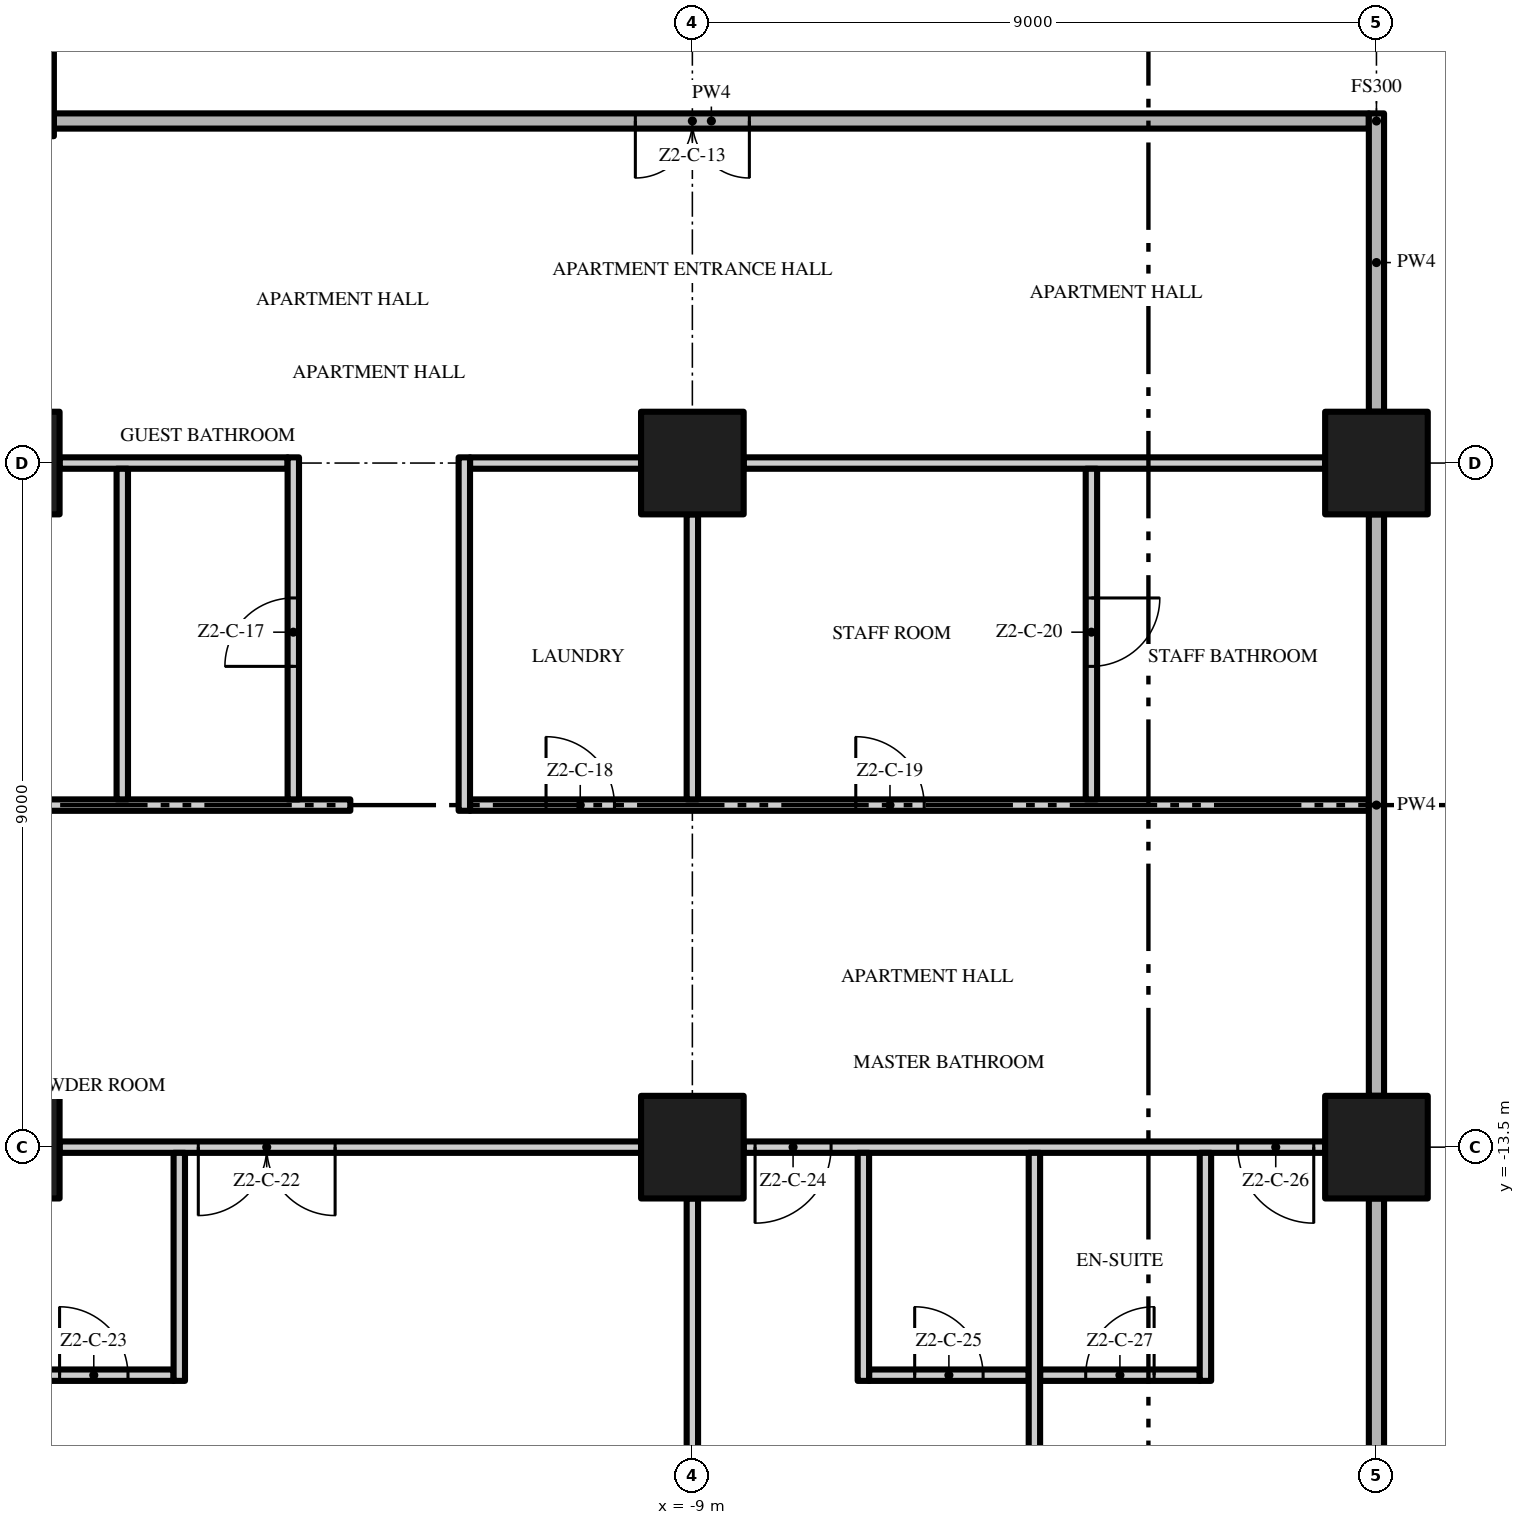
"""IFC4 building model, lengths in metres.
Left out: names, types, materials, properties, quantities, classifications, styles, units other than length and angle.
Written with IfcOpenShell. Run it as: python <this file> out.ifc"""

import sys

from ifc_helpers import new_model, si_unit, direction, frame, frame_2d, origin, origin_2d, place, context, subcontext, project, spatial, rectangle, extrude, element, fill, save


model = new_model("IFC4")
c1 = context("Model", 3, precision=1e-05, world=origin(), true_north=direction((0.0, 1.0)))
c2 = subcontext(c1, "Body", "Model", "MODEL_VIEW")
j1 = project(units=[si_unit("LENGTHUNIT", "METRE"), si_unit("PLANEANGLEUNIT", "RADIAN")], contexts=[c1])
p1 = place(None, origin())
s1 = spatial("IfcSite", under=j1, at=p1, CompositionType="ELEMENT")
p2 = place(p1, origin())
s2 = spatial("IfcBuilding", under=s1, at=p2, CompositionType="ELEMENT")
p3 = place(p2, frame((0.0, 0.0, 99.8)))
s3 = spatial("IfcBuildingStorey", under=s2, at=p3, CompositionType="ELEMENT", Elevation=99.8)
for number, where, z_axis, x_axis in (
    (1, (-18.0, -13.5, 0.0), (0.0, 0.0, 1.0), (1.0, 0.0, 0.0)),
    (2, (-18.0, -4.5, 0.0), (0.0, 0.0, 1.0), (1.0, 0.0, 0.0)),
    (3, (-9.0, -13.5, 0.0), (0.0, 0.0, 1.0), (1.0, 0.0, 0.0)),
    (4, (-9.0, -4.5, 0.0), (0.0, 0.0, 1.0), (1.0, 0.0, 0.0)),
    (5, (0.0, -13.5, 0.0), (0.0, 0.0, 1.0), (1.0, 0.0, 0.0)),
    (6, (0.0, -4.5, 0.0), (0.0, 0.0, 1.0), (1.0, 0.0, 0.0)),
):
    element("IfcColumn", number, at=place(p3, frame(where, z_axis=z_axis, x_axis=x_axis)), inside=s3, PredefinedType="COLUMN", context=c2, shape_type="SweptSolid", body=[
        extrude(rectangle(XDim=1.35, YDim=1.35, at=origin_2d()), origin(), (0.0, 0.0, 1.0), 3.5),
    ])
p4 = place(p3, frame((-17.925, -16.5, 0.0), z_axis=(0.0, 0.0, 1.0), x_axis=(1.0, 0.0, 0.0)))
e7 = element("IfcWall", 7, at=p4, inside=s3, PredefinedType="PARTITIONING", context=c2, shape_type="SweptSolid", body=[
    extrude(rectangle(XDim=2.1, YDim=0.15, at=frame_2d((1.05, 0.0))), origin(), (0.0, 0.0, 1.0), 3.5),
])
p5 = place(p4, frame((0.6, 0.0, 0.0)))
e8 = element("IfcOpeningElement", 8, at=p5, cuts=e7, PredefinedType="OPENING", context=c2, shape_type="SweptSolid", body=[
    extrude(rectangle(XDim=0.9, YDim=2.1, at=frame_2d((0.45, 1.05))), frame((0.0, 0.085, 0.0), z_axis=(0.0, -1.0, 0.0), x_axis=(1.0, 0.0, 0.0)), (0.0, 0.0, 1.0), 0.17),
])
p6 = place(p3, frame((-6.675, -16.5, 0.0), z_axis=(0.0, 0.0, 1.0), x_axis=(1.0, 0.0, 0.0)))
e9 = element("IfcWall", 9, at=p6, inside=s3, PredefinedType="PARTITIONING", context=c2, shape_type="SweptSolid", body=[
    extrude(rectangle(XDim=2.1, YDim=0.15, at=frame_2d((1.05, 0.0))), origin(), (0.0, 0.0, 1.0), 3.5),
])
p7 = place(p6, frame((0.6, 0.0, 0.0)))
e10 = element("IfcOpeningElement", 10, at=p7, cuts=e9, PredefinedType="OPENING", context=c2, shape_type="SweptSolid", body=[
    extrude(rectangle(XDim=0.9, YDim=2.1, at=frame_2d((0.45, 1.05))), frame((0.0, 0.085, 0.0), z_axis=(0.0, -1.0, 0.0), x_axis=(1.0, 0.0, 0.0)), (0.0, 0.0, 1.0), 0.17),
])
p8 = place(p3, frame((-4.425, -16.5, 0.0), z_axis=(0.0, 0.0, 1.0), x_axis=(1.0, 0.0, 0.0)))
e11 = element("IfcWall", 11, at=p8, inside=s3, PredefinedType="PARTITIONING", context=c2, shape_type="SweptSolid", body=[
    extrude(rectangle(XDim=2.1, YDim=0.15, at=frame_2d((1.05, 0.0))), origin(), (0.0, 0.0, 1.0), 3.5),
])
p9 = place(p8, frame((0.6, 0.0, 0.0)))
e12 = element("IfcOpeningElement", 12, at=p9, cuts=e11, PredefinedType="OPENING", context=c2, shape_type="SweptSolid", body=[
    extrude(rectangle(XDim=0.9, YDim=2.1, at=frame_2d((0.45, 1.05))), frame((0.0, 0.085, 0.0), z_axis=(0.0, -1.0, 0.0), x_axis=(1.0, 0.0, 0.0)), (0.0, 0.0, 1.0), 0.17),
])
p10 = place(p3, frame((-9.675, -13.5, 0.0), z_axis=(0.0, 0.0, 1.0), x_axis=(-1.0, 0.0, 0.0)))
e13 = element("IfcWall", 13, at=p10, inside=s3, PredefinedType="PARTITIONING", context=c2, shape_type="SweptSolid", body=[
    extrude(rectangle(XDim=7.65, YDim=0.15, at=frame_2d((3.825, 0.0))), origin(), (0.0, 0.0, 1.0), 3.5),
])
p11 = place(p10, frame((4.025, 0.0, 0.0)))
e14 = element("IfcOpeningElement", 14, at=p11, cuts=e13, PredefinedType="OPENING", context=c2, shape_type="SweptSolid", body=[
    extrude(rectangle(XDim=1.8, YDim=2.4, at=frame_2d((0.9, 1.2))), frame((0.0, 0.085, 0.0), z_axis=(0.0, -1.0, 0.0), x_axis=(1.0, 0.0, 0.0)), (0.0, 0.0, 1.0), 0.17),
])
p12 = place(p3, frame((-0.675, -13.5, 0.0), z_axis=(0.0, 0.0, 1.0), x_axis=(-1.0, 0.0, 0.0)))
e15 = element("IfcWall", 15, at=p12, inside=s3, PredefinedType="PARTITIONING", context=c2, shape_type="SweptSolid", body=[
    extrude(rectangle(XDim=7.65, YDim=0.15, at=frame_2d((3.825, 0.0))), origin(), (0.0, 0.0, 1.0), 3.5),
])
p13 = place(p12, frame((6.5, 0.0, 0.0)))
e16 = element("IfcOpeningElement", 16, at=p13, cuts=e15, PredefinedType="OPENING", context=c2, shape_type="SweptSolid", body=[
    extrude(rectangle(XDim=1.0, YDim=2.4, at=frame_2d((0.5, 1.2))), frame((0.0, 0.085, 0.0), z_axis=(0.0, -1.0, 0.0), x_axis=(1.0, 0.0, 0.0)), (0.0, 0.0, 1.0), 0.17),
])
p14 = place(p12, frame((0.15, 0.0, 0.0)))
e17 = element("IfcOpeningElement", 17, at=p14, cuts=e15, PredefinedType="OPENING", context=c2, shape_type="SweptSolid", body=[
    extrude(rectangle(XDim=1.0, YDim=2.4, at=frame_2d((0.5, 1.2))), frame((0.0, 0.085, 0.0), z_axis=(0.0, -1.0, 0.0), x_axis=(1.0, 0.0, 0.0)), (0.0, 0.0, 1.0), 0.17),
])
p15 = place(p3, frame((-26.7, -9.0, 0.0), z_axis=(0.0, 0.0, 1.0), x_axis=(1.0, 0.0, 0.0)))
e18 = element("IfcWall", 18, at=p15, inside=s3, PredefinedType="PARTITIONING", context=c2, shape_type="SweptSolid", body=[
    extrude(rectangle(XDim=13.2, YDim=0.15, at=frame_2d((6.6, 0.0))), origin(), (0.0, 0.0, 1.0), 3.5),
])
p16 = place(p15, frame((0.2, 0.0, 0.0)))
e19 = element("IfcOpeningElement", 19, at=p16, cuts=e18, PredefinedType="OPENING", context=c2, shape_type="SweptSolid", body=[
    extrude(rectangle(XDim=0.8, YDim=2.0, at=frame_2d((0.4, 1.0))), frame((0.0, 0.085, 0.0), z_axis=(0.0, -1.0, 0.0), x_axis=(1.0, 0.0, 0.0)), (0.0, 0.0, 1.0), 0.17),
])
p17 = place(p3, frame((-11.925, -9.0, 0.0), z_axis=(0.0, 0.0, 1.0), x_axis=(1.0, 0.0, 0.0)))
e20 = element("IfcWall", 20, at=p17, inside=s3, PredefinedType="PARTITIONING", context=c2, shape_type="SweptSolid", body=[
    extrude(rectangle(XDim=11.825, YDim=0.15, at=frame_2d((5.912, 0.0))), origin(), (0.0, 0.0, 1.0), 3.5),
])
p18 = place(p17, frame((1.0, 0.0, 0.0)))
e21 = element("IfcOpeningElement", 21, at=p18, cuts=e20, PredefinedType="OPENING", context=c2, shape_type="SweptSolid", body=[
    extrude(rectangle(XDim=0.9, YDim=2.1, at=frame_2d((0.45, 1.05))), frame((0.0, 0.085, 0.0), z_axis=(0.0, -1.0, 0.0), x_axis=(1.0, 0.0, 0.0)), (0.0, 0.0, 1.0), 0.17),
])
p19 = place(p17, frame((5.075, 0.0, 0.0)))
e22 = element("IfcOpeningElement", 22, at=p19, cuts=e20, PredefinedType="OPENING", context=c2, shape_type="SweptSolid", body=[
    extrude(rectangle(XDim=0.9, YDim=2.1, at=frame_2d((0.45, 1.05))), frame((0.0, 0.085, 0.0), z_axis=(0.0, -1.0, 0.0), x_axis=(1.0, 0.0, 0.0)), (0.0, 0.0, 1.0), 0.17),
])
p20 = place(p3, frame((-17.325, -4.5, 0.0), z_axis=(0.0, 0.0, 1.0), x_axis=(1.0, 0.0, 0.0)))
e23 = element("IfcWall", 23, at=p20, inside=s3, PredefinedType="PARTITIONING", context=c2, shape_type="SweptSolid", body=[
    extrude(rectangle(XDim=3.0, YDim=0.15, at=frame_2d((1.5, 0.0))), origin(), (0.0, 0.0, 1.0), 3.5),
])
p21 = place(p3, frame((-11.925, -4.5, 0.0), z_axis=(0.0, 0.0, 1.0), x_axis=(1.0, 0.0, 0.0)))
e24 = element("IfcWall", 24, at=p21, inside=s3, PredefinedType="PARTITIONING", context=c2, shape_type="SweptSolid", body=[
    extrude(rectangle(XDim=2.25, YDim=0.15, at=frame_2d((1.125, 0.0))), origin(), (0.0, 0.0, 1.0), 3.5),
])
p22 = place(p3, frame((-8.325, -4.5, 0.0), z_axis=(0.0, 0.0, 1.0), x_axis=(1.0, 0.0, 0.0)))
e25 = element("IfcWall", 25, at=p22, inside=s3, PredefinedType="PARTITIONING", context=c2, shape_type="SweptSolid", body=[
    extrude(rectangle(XDim=7.65, YDim=0.15, at=frame_2d((3.825, 0.0))), origin(), (0.0, 0.0, 1.0), 3.5),
])
p23 = place(p3, frame((-0.1, 0.0, 0.0), z_axis=(0.0, 0.0, 1.0), x_axis=(-1.0, 0.0, 0.0)))
e26 = element("IfcWall", 26, at=p23, inside=s3, PredefinedType="PARTITIONING", context=c2, shape_type="SweptSolid", body=[
    extrude(rectangle(XDim=17.3, YDim=0.2, at=frame_2d((8.65, 0.0))), origin(), (0.0, 0.0, 1.0), 3.5),
])
p24 = place(p23, frame((8.15, 0.0, 0.0)))
e27 = element("IfcOpeningElement", 27, at=p24, cuts=e26, PredefinedType="OPENING", context=c2, shape_type="SweptSolid", body=[
    extrude(rectangle(XDim=1.5, YDim=2.4, at=frame_2d((0.75, 1.2))), frame((0.0, 0.11, 0.0), z_axis=(0.0, -1.0, 0.0), x_axis=(1.0, 0.0, 0.0)), (0.0, 0.0, 1.0), 0.22),
])
p25 = place(p3, frame((-17.5, -0.2, 0.0), z_axis=(0.0, 0.0, 1.0), x_axis=(0.0, 1.0, 0.0)))
e28 = element("IfcWall", 28, at=p25, inside=s3, PredefinedType="PARTITIONING", context=c2, shape_type="SweptSolid", body=[
    extrude(rectangle(XDim=4.025, YDim=0.2, at=frame_2d((2.013, 0.0))), origin(), (0.0, 0.0, 1.0), 3.5),
])
p26 = place(p3, frame((-16.5, -8.925, 0.0), z_axis=(0.0, 0.0, 1.0), x_axis=(0.0, 1.0, 0.0)))
e29 = element("IfcWall", 29, at=p26, inside=s3, PredefinedType="PARTITIONING", context=c2, shape_type="SweptSolid", body=[
    extrude(rectangle(XDim=4.35, YDim=0.15, at=frame_2d((2.175, 0.0))), origin(), (0.0, 0.0, 1.0), 3.5),
])
p27 = place(p3, frame((-15.75, -16.575, 0.0), z_axis=(0.0, 0.0, 1.0), x_axis=(0.0, 1.0, 0.0)))
e30 = element("IfcWall", 30, at=p27, inside=s3, PredefinedType="PARTITIONING", context=c2, shape_type="SweptSolid", body=[
    extrude(rectangle(XDim=3.0, YDim=0.15, at=frame_2d((1.5, 0.0))), origin(), (0.0, 0.0, 1.0), 3.5),
])
p28 = place(p3, frame((-14.25, -8.925, 0.0), z_axis=(0.0, 0.0, 1.0), x_axis=(0.0, 1.0, 0.0)))
e31 = element("IfcWall", 31, at=p28, inside=s3, PredefinedType="PARTITIONING", context=c2, shape_type="SweptSolid", body=[
    extrude(rectangle(XDim=4.5, YDim=0.15, at=frame_2d((2.25, 0.0))), origin(), (0.0, 0.0, 1.0), 3.5),
])
p29 = place(p28, frame((1.75, 0.0, 0.0)))
e32 = element("IfcOpeningElement", 32, at=p29, cuts=e31, PredefinedType="OPENING", context=c2, shape_type="SweptSolid", body=[
    extrude(rectangle(XDim=0.9, YDim=2.1, at=frame_2d((0.45, 1.05))), frame((0.0, 0.085, 0.0), z_axis=(0.0, -1.0, 0.0), x_axis=(1.0, 0.0, 0.0)), (0.0, 0.0, 1.0), 0.17),
])
p30 = place(p3, frame((-12.0, -9.075, 0.0), z_axis=(0.0, 0.0, 1.0), x_axis=(0.0, 1.0, 0.0)))
e33 = element("IfcWall", 33, at=p30, inside=s3, PredefinedType="PARTITIONING", context=c2, shape_type="SweptSolid", body=[
    extrude(rectangle(XDim=4.65, YDim=0.15, at=frame_2d((2.325, 0.0))), origin(), (0.0, 0.0, 1.0), 3.5),
])
p31 = place(p3, frame((-9.0, -21.25, 0.0), z_axis=(0.0, 0.0, 1.0), x_axis=(0.0, 1.0, 0.0)))
e34 = element("IfcWall", 34, at=p31, inside=s3, PredefinedType="PARTITIONING", context=c2, shape_type="SweptSolid", body=[
    extrude(rectangle(XDim=7.075, YDim=0.15, at=frame_2d((3.538, 0.0))), origin(), (0.0, 0.0, 1.0), 3.5),
])
p32 = place(p3, frame((-9.0, -8.925, 0.0), z_axis=(0.0, 0.0, 1.0), x_axis=(0.0, 1.0, 0.0)))
e35 = element("IfcWall", 35, at=p32, inside=s3, PredefinedType="PARTITIONING", context=c2, shape_type="SweptSolid", body=[
    extrude(rectangle(XDim=3.75, YDim=0.15, at=frame_2d((1.875, 0.0))), origin(), (0.0, 0.0, 1.0), 3.5),
])
p33 = place(p3, frame((-6.75, -16.575, 0.0), z_axis=(0.0, 0.0, 1.0), x_axis=(0.0, 1.0, 0.0)))
e36 = element("IfcWall", 36, at=p33, inside=s3, PredefinedType="PARTITIONING", context=c2, shape_type="SweptSolid", body=[
    extrude(rectangle(XDim=3.0, YDim=0.15, at=frame_2d((1.5, 0.0))), origin(), (0.0, 0.0, 1.0), 3.5),
])
p34 = place(p3, frame((-4.5, -22.2, 0.0), z_axis=(0.0, 0.0, 1.0), x_axis=(0.0, 1.0, 0.0)))
e37 = element("IfcWall", 37, at=p34, inside=s3, PredefinedType="PARTITIONING", context=c2, shape_type="SweptSolid", body=[
    extrude(rectangle(XDim=8.625, YDim=0.15, at=frame_2d((4.312, 0.0))), origin(), (0.0, 0.0, 1.0), 3.5),
])
p35 = place(p3, frame((-3.75, -4.575, 0.0), z_axis=(0.0, 0.0, 1.0), x_axis=(0.0, -1.0, 0.0)))
e38 = element("IfcWall", 38, at=p35, inside=s3, PredefinedType="PARTITIONING", context=c2, shape_type="SweptSolid", body=[
    extrude(rectangle(XDim=4.35, YDim=0.15, at=frame_2d((2.175, 0.0))), origin(), (0.0, 0.0, 1.0), 3.5),
])
p36 = place(p35, frame((1.7, 0.0, 0.0)))
e39 = element("IfcOpeningElement", 39, at=p36, cuts=e38, PredefinedType="OPENING", context=c2, shape_type="SweptSolid", body=[
    extrude(rectangle(XDim=0.9, YDim=2.1, at=frame_2d((0.45, 1.05))), frame((0.0, 0.085, 0.0), z_axis=(0.0, -1.0, 0.0), x_axis=(1.0, 0.0, 0.0)), (0.0, 0.0, 1.0), 0.17),
])
p37 = place(p3, frame((-2.25, -16.575, 0.0), z_axis=(0.0, 0.0, 1.0), x_axis=(0.0, 1.0, 0.0)))
e40 = element("IfcWall", 40, at=p37, inside=s3, PredefinedType="PARTITIONING", context=c2, shape_type="SweptSolid", body=[
    extrude(rectangle(XDim=3.0, YDim=0.15, at=frame_2d((1.5, 0.0))), origin(), (0.0, 0.0, 1.0), 3.5),
])
p38 = place(p3, frame((0.0, -21.25, 0.0), z_axis=(0.0, 0.0, 1.0), x_axis=(0.0, 1.0, 0.0)))
e41 = element("IfcWall", 41, at=p38, inside=s3, PredefinedType="PARTITIONING", context=c2, shape_type="SweptSolid", body=[
    extrude(rectangle(XDim=7.075, YDim=0.2, at=frame_2d((3.538, 0.0))), origin(), (0.0, 0.0, 1.0), 3.5),
])
p39 = place(p3, frame((0.0, -12.825, 0.0), z_axis=(0.0, 0.0, 1.0), x_axis=(0.0, 1.0, 0.0)))
e42 = element("IfcWall", 42, at=p39, inside=s3, PredefinedType="PARTITIONING", context=c2, shape_type="SweptSolid", body=[
    extrude(rectangle(XDim=7.65, YDim=0.2, at=frame_2d((3.825, 0.0))), origin(), (0.0, 0.0, 1.0), 3.5),
])
p40 = place(p3, frame((0.0, -3.825, 0.0), z_axis=(0.0, 0.0, 1.0), x_axis=(0.0, 1.0, 0.0)))
e43 = element("IfcWall", 43, at=p40, inside=s3, PredefinedType="PARTITIONING", context=c2, shape_type="SweptSolid", body=[
    extrude(rectangle(XDim=3.925, YDim=0.2, at=frame_2d((1.962, 0.0))), origin(), (0.0, 0.0, 1.0), 3.5),
])
p41 = place(p24, origin())
e44 = element("IfcDoor", 44, at=p41, inside=s3, OperationType="DOUBLE_DOOR_SINGLE_SWING", PredefinedType="DOOR", context=c2, shape_type="SweptSolid", body=[
    extrude(rectangle(XDim=1.5, YDim=2.4, at=frame_2d((0.75, 1.2))), frame((0.0, 0.025, 0.0), z_axis=(0.0, -1.0, 0.0), x_axis=(1.0, 0.0, 0.0)), (0.0, 0.0, 1.0), 0.05),
])
fill(e27, e44)
p42 = place(p29, origin())
e45 = element("IfcDoor", 45, at=p42, inside=s3, OperationType="SINGLE_SWING_LEFT", PredefinedType="DOOR", context=c2, shape_type="SweptSolid", body=[
    extrude(rectangle(XDim=0.9, YDim=2.1, at=frame_2d((0.45, 1.05))), frame((0.0, 0.025, 0.0), z_axis=(0.0, -1.0, 0.0), x_axis=(1.0, 0.0, 0.0)), (0.0, 0.0, 1.0), 0.05),
])
fill(e32, e45)
p43 = place(p18, origin())
e46 = element("IfcDoor", 46, at=p43, inside=s3, OperationType="SINGLE_SWING_LEFT", PredefinedType="DOOR", context=c2, shape_type="SweptSolid", body=[
    extrude(rectangle(XDim=0.9, YDim=2.1, at=frame_2d((0.45, 1.05))), frame((0.0, 0.025, 0.0), z_axis=(0.0, -1.0, 0.0), x_axis=(1.0, 0.0, 0.0)), (0.0, 0.0, 1.0), 0.05),
])
fill(e21, e46)
p44 = place(p19, origin())
e47 = element("IfcDoor", 47, at=p44, inside=s3, OperationType="SINGLE_SWING_LEFT", PredefinedType="DOOR", context=c2, shape_type="SweptSolid", body=[
    extrude(rectangle(XDim=0.9, YDim=2.1, at=frame_2d((0.45, 1.05))), frame((0.0, 0.025, 0.0), z_axis=(0.0, -1.0, 0.0), x_axis=(1.0, 0.0, 0.0)), (0.0, 0.0, 1.0), 0.05),
])
fill(e22, e47)
p45 = place(p36, origin())
e48 = element("IfcDoor", 48, at=p45, inside=s3, OperationType="SINGLE_SWING_LEFT", PredefinedType="DOOR", context=c2, shape_type="SweptSolid", body=[
    extrude(rectangle(XDim=0.9, YDim=2.1, at=frame_2d((0.45, 1.05))), frame((0.0, 0.025, 0.0), z_axis=(0.0, -1.0, 0.0), x_axis=(1.0, 0.0, 0.0)), (0.0, 0.0, 1.0), 0.05),
])
fill(e39, e48)
p46 = place(p11, origin())
e49 = element("IfcDoor", 49, at=p46, inside=s3, OperationType="DOUBLE_DOOR_SINGLE_SWING", PredefinedType="DOOR", context=c2, shape_type="SweptSolid", body=[
    extrude(rectangle(XDim=1.8, YDim=2.4, at=frame_2d((0.9, 1.2))), frame((0.0, 0.025, 0.0), z_axis=(0.0, -1.0, 0.0), x_axis=(1.0, 0.0, 0.0)), (0.0, 0.0, 1.0), 0.05),
])
fill(e14, e49)
p47 = place(p5, origin())
e50 = element("IfcDoor", 50, at=p47, inside=s3, OperationType="SINGLE_SWING_LEFT", PredefinedType="DOOR", context=c2, shape_type="SweptSolid", body=[
    extrude(rectangle(XDim=0.9, YDim=2.1, at=frame_2d((0.45, 1.05))), frame((0.0, 0.025, 0.0), z_axis=(0.0, -1.0, 0.0), x_axis=(1.0, 0.0, 0.0)), (0.0, 0.0, 1.0), 0.05),
])
fill(e8, e50)
p48 = place(p13, origin())
e51 = element("IfcDoor", 51, at=p48, inside=s3, OperationType="SINGLE_SWING_RIGHT", PredefinedType="DOOR", context=c2, shape_type="SweptSolid", body=[
    extrude(rectangle(XDim=1.0, YDim=2.4, at=frame_2d((0.5, 1.2))), frame((0.0, 0.025, 0.0), z_axis=(0.0, -1.0, 0.0), x_axis=(1.0, 0.0, 0.0)), (0.0, 0.0, 1.0), 0.05),
])
fill(e16, e51)
p49 = place(p7, origin())
e52 = element("IfcDoor", 52, at=p49, inside=s3, OperationType="SINGLE_SWING_LEFT", PredefinedType="DOOR", context=c2, shape_type="SweptSolid", body=[
    extrude(rectangle(XDim=0.9, YDim=2.1, at=frame_2d((0.45, 1.05))), frame((0.0, 0.025, 0.0), z_axis=(0.0, -1.0, 0.0), x_axis=(1.0, 0.0, 0.0)), (0.0, 0.0, 1.0), 0.05),
])
fill(e10, e52)
p50 = place(p14, origin())
e53 = element("IfcDoor", 53, at=p50, inside=s3, OperationType="SINGLE_SWING_LEFT", PredefinedType="DOOR", context=c2, shape_type="SweptSolid", body=[
    extrude(rectangle(XDim=1.0, YDim=2.4, at=frame_2d((0.5, 1.2))), frame((0.0, 0.025, 0.0), z_axis=(0.0, -1.0, 0.0), x_axis=(1.0, 0.0, 0.0)), (0.0, 0.0, 1.0), 0.05),
])
fill(e17, e53)
p51 = place(p9, origin())
e54 = element("IfcDoor", 54, at=p51, inside=s3, OperationType="SINGLE_SWING_RIGHT", PredefinedType="DOOR", context=c2, shape_type="SweptSolid", body=[
    extrude(rectangle(XDim=0.9, YDim=2.1, at=frame_2d((0.45, 1.05))), frame((0.0, 0.025, 0.0), z_axis=(0.0, -1.0, 0.0), x_axis=(1.0, 0.0, 0.0)), (0.0, 0.0, 1.0), 0.05),
])
fill(e12, e54)
save(model, sys.argv[1])
